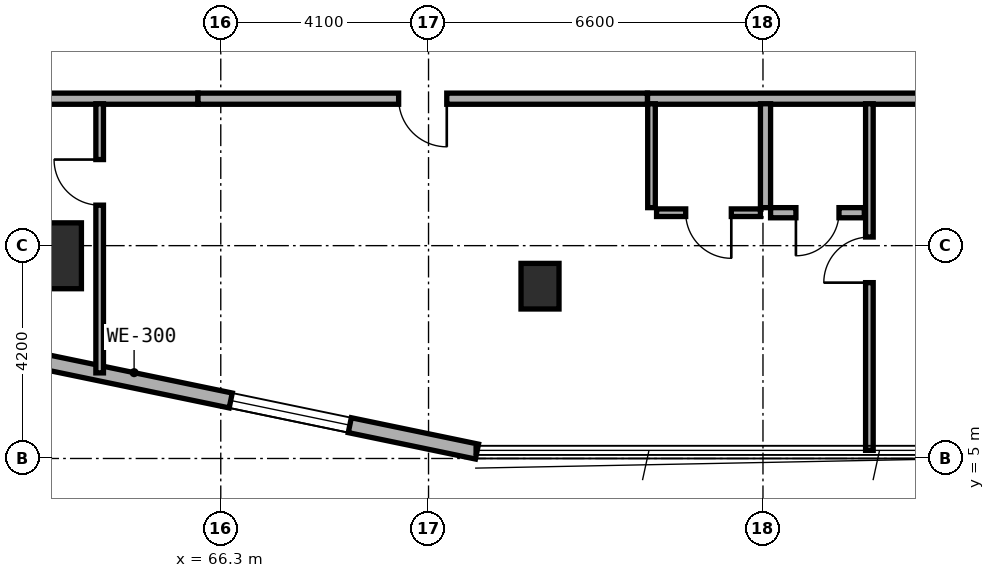
"""IFC4 building model, lengths in metres.
Left out: names, types, materials, properties, quantities, classifications, styles, units other than length and angle.
Written with IfcOpenShell. Run it as: python <this file> out.ifc"""

import sys

from ifc_helpers import new_model, si_unit, direction, frame, frame_2d, origin, origin_2d, place, context, subcontext, project, spatial, rectangle, extrude, element, fill, save


model = new_model("IFC4")
c1 = context("Model", 3, precision=1e-05, world=origin(), true_north=direction((0.0, 1.0)))
c2 = subcontext(c1, "Body", "Model", "MODEL_VIEW")
j1 = project(units=[si_unit("LENGTHUNIT", "METRE"), si_unit("PLANEANGLEUNIT", "RADIAN")], contexts=[c1])
p1 = place(None, origin())
s1 = spatial("IfcSite", under=j1, at=p1, CompositionType="ELEMENT")
p2 = place(p1, origin())
s2 = spatial("IfcBuilding", under=s1, at=p2, CompositionType="ELEMENT")
p3 = place(p2, frame((0.0, 0.0, 24.0)))
s3 = spatial("IfcBuildingStorey", under=s2, at=p3, CompositionType="ELEMENT", Elevation=24.0)
p4 = place(p3, frame((72.6, 8.4, 0.0), z_axis=(0.0, 0.0, 1.0), x_axis=(1.0, 0.0, 0.0)))
e1 = element("IfcColumn", 1, at=p4, inside=s3, PredefinedType="COLUMN", context=c2, shape_type="SweptSolid", body=[
    extrude(rectangle(XDim=0.75, YDim=0.9, at=origin_2d()), origin(), (0.0, 0.0, 1.0), 3.5),
])
p5 = place(p3, frame((63.0, 9.0, 0.0), z_axis=(0.0, 0.0, 1.0), x_axis=(1.0, 0.0, 0.0)))
e2 = element("IfcColumn", 2, at=p5, inside=s3, PredefinedType="COLUMN", context=c2, shape_type="SweptSolid", body=[
    extrude(rectangle(XDim=1.1, YDim=1.3, at=origin_2d()), origin(), (0.0, 0.0, 1.0), 3.5),
])
p6 = place(p3, frame((62.622, 6.949, 0.0), z_axis=(0.0, 0.0, 1.0), x_axis=(0.979127260729, -0.203248142175, 0.0)))
e3 = element("IfcWall", 3, at=p6, inside=s3, PredefinedType="STANDARD", context=c2, shape_type="SweptSolid", body=[
    extrude(rectangle(XDim=8.92, YDim=0.3, at=frame_2d((4.46, 0.0))), origin(), (0.0, 0.0, 1.0), 3.25),
])
p7 = place(p6, frame((3.957, 0.0, 0.8)))
e4 = element("IfcOpeningElement", 4, at=p7, cuts=e3, PredefinedType="OPENING", context=c2, shape_type="SweptSolid", body=[
    extrude(rectangle(XDim=2.4, YDim=1.6, at=frame_2d((1.2, 0.8))), frame((0.0, 0.16, 0.0), z_axis=(0.0, -1.0, 0.0), x_axis=(1.0, 0.0, 0.0)), (0.0, 0.0, 1.0), 0.32),
])
p8 = place(p3, frame((58.16, 12.1, 0.0), z_axis=(0.0, 0.0, 1.0), x_axis=(1.0, 0.0, 0.0)))
e5 = element("IfcWall", 5, at=p8, inside=s3, PredefinedType="SOLIDWALL", context=c2, shape_type="SweptSolid", body=[
    extrude(rectangle(XDim=7.69, YDim=0.22, at=frame_2d((3.845, 0.0))), origin(), (0.0, 0.0, 1.0), 2.865),
])
p9 = place(p3, frame((74.72, 12.1, 0.0), z_axis=(0.0, 0.0, 1.0), x_axis=(1.0, 0.0, 0.0)))
e6 = element("IfcWall", 6, at=p9, inside=s3, PredefinedType="SOLIDWALL", context=c2, shape_type="SweptSolid", body=[
    extrude(rectangle(XDim=6.68, YDim=0.22, at=frame_2d((3.34, 0.0))), origin(), (0.0, 0.0, 1.0), 2.725),
])
p10 = place(p3, frame((65.85, 12.1, 0.0), z_axis=(0.0, 0.0, 1.0), x_axis=(1.0, 0.0, 0.0)))
e7 = element("IfcWall", 7, at=p10, inside=s3, PredefinedType="SOLIDWALL", context=c2, shape_type="SweptSolid", body=[
    extrude(rectangle(XDim=8.87, YDim=0.22, at=frame_2d((4.435, 0.0))), origin(), (0.0, 0.0, 1.0), 2.725),
])
p11 = place(p10, frame((3.96, 0.0, 0.0)))
e8 = element("IfcOpeningElement", 8, at=p11, cuts=e7, PredefinedType="OPENING", context=c2, shape_type="SweptSolid", body=[
    extrude(rectangle(XDim=0.95, YDim=2.1, at=frame_2d((0.475, 1.05))), frame((0.0, 0.12, 0.0), z_axis=(0.0, -1.0, 0.0), x_axis=(1.0, 0.0, 0.0)), (0.0, 0.0, 1.0), 0.24),
])
p12 = place(p3, frame((63.91, 6.689, 0.0), z_axis=(0.0, 0.0, 1.0), x_axis=(0.0, 1.0, 0.0)))
e9 = element("IfcWall", 9, at=p12, inside=s3, PredefinedType="PARTITIONING", context=c2, shape_type="SweptSolid", body=[
    extrude(rectangle(XDim=5.311, YDim=0.15, at=frame_2d((2.656, 0.0))), origin(), (0.0, 0.0, 1.0), 2.865),
])
p13 = place(p12, frame((3.31, 0.0, 0.0)))
e10 = element("IfcOpeningElement", 10, at=p13, cuts=e9, PredefinedType="OPENING", context=c2, shape_type="SweptSolid", body=[
    extrude(rectangle(XDim=0.9, YDim=2.1, at=frame_2d((0.45, 1.05))), frame((0.0, 0.085, 0.0), z_axis=(0.0, -1.0, 0.0), x_axis=(1.0, 0.0, 0.0)), (0.0, 0.0, 1.0), 0.17),
])
p14 = place(p3, frame((79.1, 5.16, 0.0), z_axis=(0.0, 0.0, 1.0), x_axis=(0.0, 1.0, 0.0)))
e11 = element("IfcWall", 11, at=p14, inside=s3, PredefinedType="PARTITIONING", context=c2, shape_type="SweptSolid", body=[
    extrude(rectangle(XDim=6.84, YDim=0.15, at=frame_2d((3.42, 0.0))), origin(), (0.0, 0.0, 1.0), 2.865),
])
p15 = place(p14, frame((3.31, 0.0, 0.0)))
e12 = element("IfcOpeningElement", 12, at=p15, cuts=e11, PredefinedType="OPENING", context=c2, shape_type="SweptSolid", body=[
    extrude(rectangle(XDim=0.9, YDim=2.1, at=frame_2d((0.45, 1.05))), frame((0.0, 0.085, 0.0), z_axis=(0.0, -1.0, 0.0), x_axis=(1.0, 0.0, 0.0)), (0.0, 0.0, 1.0), 0.17),
])
p16 = place(p3, frame((77.05, 9.95, 0.0), z_axis=(0.0, 0.0, 1.0), x_axis=(0.0, 1.0, 0.0)))
e13 = element("IfcWall", 13, at=p16, inside=s3, PredefinedType="PLUMBINGWALL", context=c2, shape_type="SweptSolid", body=[
    extrude(rectangle(XDim=2.05, YDim=0.2, at=frame_2d((1.025, 0.0))), origin(), (0.0, 0.0, 1.0), 2.985),
])
p17 = place(p3, frame((74.8, 9.95, 0.0), z_axis=(0.0, 0.0, 1.0), x_axis=(0.0, 1.0, 0.0)))
e14 = element("IfcWall", 14, at=p17, inside=s3, PredefinedType="PARTITIONING", context=c2, shape_type="SweptSolid", body=[
    extrude(rectangle(XDim=2.05, YDim=0.15, at=frame_2d((1.025, 0.0))), origin(), (0.0, 0.0, 1.0), 2.985),
])
p18 = place(p3, frame((77.15, 9.85, 0.0), z_axis=(0.0, 0.0, 1.0), x_axis=(1.0, 0.0, 0.0)))
e15 = element("IfcWall", 15, at=p18, inside=s3, PredefinedType="PLUMBINGWALL", context=c2, shape_type="SweptSolid", body=[
    extrude(rectangle(XDim=1.85, YDim=0.2, at=frame_2d((0.925, 0.0))), origin(), (0.0, 0.0, 1.0), 3.22),
])
p19 = place(p18, frame((0.5, 0.0, 0.0)))
e16 = element("IfcOpeningElement", 16, at=p19, cuts=e15, PredefinedType="OPENING", context=c2, shape_type="SweptSolid", body=[
    extrude(rectangle(XDim=0.85, YDim=2.1, at=frame_2d((0.425, 1.05))), frame((0.0, 0.11, 0.0), z_axis=(0.0, -1.0, 0.0), x_axis=(1.0, 0.0, 0.0)), (0.0, 0.0, 1.0), 0.22),
])
p20 = place(p3, frame((74.9, 9.85, 0.0), z_axis=(0.0, 0.0, 1.0), x_axis=(1.0, 0.0, 0.0)))
e17 = element("IfcWall", 17, at=p20, inside=s3, PredefinedType="PARTITIONING", context=c2, shape_type="SweptSolid", body=[
    extrude(rectangle(XDim=2.05, YDim=0.15, at=frame_2d((1.025, 0.0))), origin(), (0.0, 0.0, 1.0), 3.22),
])
p21 = place(p20, frame((0.575, 0.0, 0.0)))
e18 = element("IfcOpeningElement", 18, at=p21, cuts=e17, PredefinedType="OPENING", context=c2, shape_type="SweptSolid", body=[
    extrude(rectangle(XDim=0.9, YDim=2.1, at=frame_2d((0.45, 1.05))), frame((0.0, 0.085, 0.0), z_axis=(0.0, -1.0, 0.0), x_axis=(1.0, 0.0, 0.0)), (0.0, 0.0, 1.0), 0.17),
])
p22 = place(p7, origin())
e19 = element("IfcWindow", 19, at=p22, inside=s3, PartitioningType="SINGLE_PANEL", PredefinedType="WINDOW", context=c2, shape_type="SweptSolid", body=[
    extrude(rectangle(XDim=2.4, YDim=1.6, at=frame_2d((1.2, 0.8))), frame((0.0, 0.03, 0.0), z_axis=(0.0, -1.0, 0.0), x_axis=(1.0, 0.0, 0.0)), (0.0, 0.0, 1.0), 0.06),
])
fill(e4, e19)
p23 = place(p11, frame((0.95, 0.0, 0.0), z_axis=(0.0, 0.0, 1.0), x_axis=(-1.0, 0.0, 0.0)))
e20 = element("IfcDoor", 20, at=p23, inside=s3, OperationType="SINGLE_SWING_LEFT", PredefinedType="DOOR", context=c2, shape_type="SweptSolid", body=[
    extrude(rectangle(XDim=0.95, YDim=2.1, at=frame_2d((0.475, 1.05))), frame((0.0, 0.025, 0.0), z_axis=(0.0, -1.0, 0.0), x_axis=(1.0, 0.0, 0.0)), (0.0, 0.0, 1.0), 0.05),
])
fill(e8, e20)
p24 = place(p13, origin())
e21 = element("IfcDoor", 21, at=p24, inside=s3, OperationType="SINGLE_SWING_RIGHT", PredefinedType="DOOR", context=c2, shape_type="SweptSolid", body=[
    extrude(rectangle(XDim=0.9, YDim=2.1, at=frame_2d((0.45, 1.05))), frame((0.0, 0.025, 0.0), z_axis=(0.0, -1.0, 0.0), x_axis=(1.0, 0.0, 0.0)), (0.0, 0.0, 1.0), 0.05),
])
fill(e10, e21)
p25 = place(p15, origin())
e22 = element("IfcDoor", 22, at=p25, inside=s3, OperationType="SINGLE_SWING_LEFT", PredefinedType="DOOR", context=c2, shape_type="SweptSolid", body=[
    extrude(rectangle(XDim=0.9, YDim=2.1, at=frame_2d((0.45, 1.05))), frame((0.0, 0.025, 0.0), z_axis=(0.0, -1.0, 0.0), x_axis=(1.0, 0.0, 0.0)), (0.0, 0.0, 1.0), 0.05),
])
fill(e12, e22)
p26 = place(p19, frame((0.85, 0.0, 0.0), z_axis=(0.0, 0.0, 1.0), x_axis=(-1.0, 0.0, 0.0)))
e23 = element("IfcDoor", 23, at=p26, inside=s3, OperationType="SINGLE_SWING_RIGHT", PredefinedType="DOOR", context=c2, shape_type="SweptSolid", body=[
    extrude(rectangle(XDim=0.85, YDim=2.1, at=frame_2d((0.425, 1.05))), frame((0.0, 0.025, 0.0), z_axis=(0.0, -1.0, 0.0), x_axis=(1.0, 0.0, 0.0)), (0.0, 0.0, 1.0), 0.05),
])
fill(e16, e23)
p27 = place(p21, frame((0.9, 0.0, 0.0), z_axis=(0.0, 0.0, 1.0), x_axis=(-1.0, 0.0, 0.0)))
e24 = element("IfcDoor", 24, at=p27, inside=s3, OperationType="SINGLE_SWING_LEFT", PredefinedType="DOOR", context=c2, shape_type="SweptSolid", body=[
    extrude(rectangle(XDim=0.9, YDim=2.1, at=frame_2d((0.45, 1.05))), frame((0.0, 0.025, 0.0), z_axis=(0.0, -1.0, 0.0), x_axis=(1.0, 0.0, 0.0)), (0.0, 0.0, 1.0), 0.05),
])
fill(e18, e24)
save(model, sys.argv[1])
